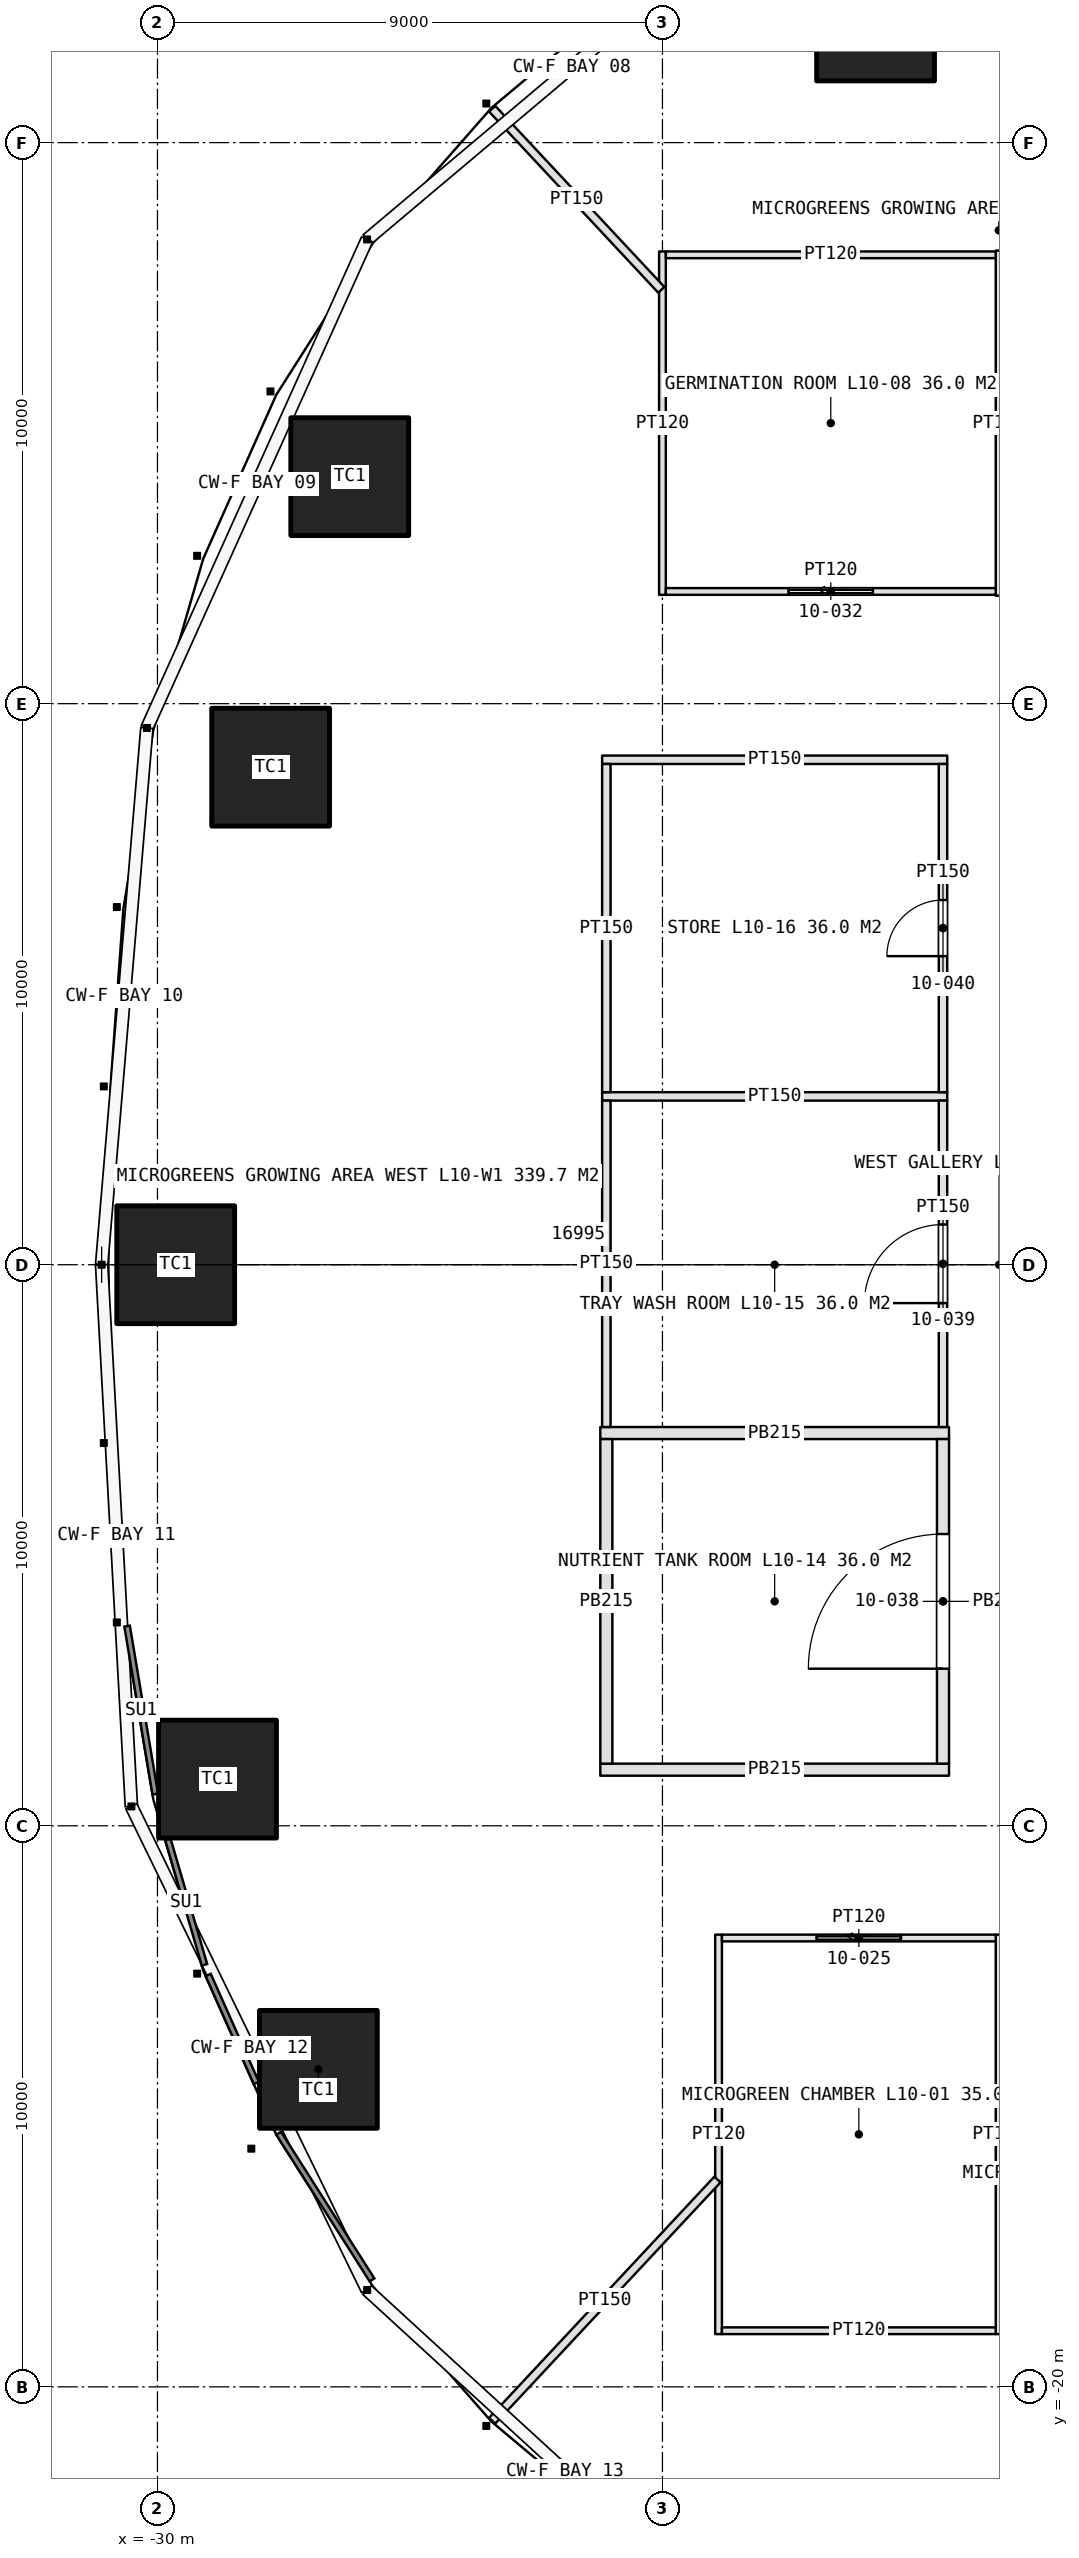
"""IFC4 building model, lengths in metres.
Left out: names, types, materials, properties, quantities, classifications, styles, units other than length and angle.
Written with IfcOpenShell. Run it as: python <this file> out.ifc"""

import sys

from ifc_helpers import new_model, si_unit, direction, frame, frame_2d, origin, origin_2d, place, context, subcontext, project, spatial, rectangle, extrude, element, fill, save


model = new_model("IFC4")
c1 = context("Model", 3, precision=1e-05, world=origin(), true_north=direction((0.0, 1.0)))
c2 = subcontext(c1, "Body", "Model", "MODEL_VIEW")
j1 = project(units=[si_unit("LENGTHUNIT", "METRE"), si_unit("PLANEANGLEUNIT", "RADIAN")], contexts=[c1])
p1 = place(None, origin())
s1 = spatial("IfcSite", under=j1, at=p1, CompositionType="ELEMENT")
p2 = place(p1, origin())
s2 = spatial("IfcBuilding", under=s1, at=p2, CompositionType="ELEMENT")
p3 = place(p2, frame((0.0, 0.0, 50.0)))
s3 = spatial("IfcBuildingStorey", under=s2, at=p3, CompositionType="ELEMENT", Elevation=50.0)
for number, where, z_axis, x_axis in (
    (1, (-17.202, 22.15, 0.0), (0.0, 0.0, 1.0), (1.0, 0.0, 0.0)),
    (2, (-26.573, 14.046, 0.0), (0.0, 0.0, 1.0), (1.0, 0.0, 0.0)),
    (3, (-27.983, 8.868, 0.0), (0.0, 0.0, 1.0), (1.0, 0.0, 0.0)),
    (4, (-29.675, 0.0, 0.0), (0.0, 0.0, 1.0), (1.0, 0.0, 0.0)),
    (5, (-28.93, -9.168, 0.0), (0.0, 0.0, 1.0), (1.0, 0.0, 0.0)),
    (6, (-27.132, -14.341, 0.0), (0.0, 0.0, 1.0), (1.0, 0.0, 0.0)),
):
    element("IfcColumn", number, at=place(p3, frame(where, z_axis=z_axis, x_axis=x_axis)), inside=s3, PredefinedType="COLUMN", context=c2, shape_type="SweptSolid", body=[
        extrude(rectangle(XDim=2.1, YDim=2.1, at=origin_2d()), origin(), (0.0, 0.0, 1.0), 5.0),
    ])
for number, where, z_axis, x_axis in (
    (7, (-20.0, -11.94, 0.0), (0.0, 0.0, 1.0), (0.0, -1.0, 0.0)),
    (8, (-15.0, -11.94, 0.0), (0.0, 0.0, 1.0), (0.0, -1.0, 0.0)),
):
    element("IfcWall", number, at=place(p3, frame(where, z_axis=z_axis, x_axis=x_axis)), inside=s3, PredefinedType="PARTITIONING", context=c2, shape_type="SweptSolid", body=[
        extrude(rectangle(XDim=7.12, YDim=0.12, at=frame_2d((3.56, 0.0))), origin(), (0.0, 0.0, 1.0), 3.6),
    ])
p4 = place(p3, frame((-19.94, -12.0, 0.0), z_axis=(0.0, 0.0, 1.0), x_axis=(1.0, 0.0, 0.0)))
e9 = element("IfcWall", 9, at=p4, inside=s3, PredefinedType="PARTITIONING", context=c2, shape_type="SweptSolid", body=[
    extrude(rectangle(XDim=4.88, YDim=0.12, at=frame_2d((2.44, 0.0))), origin(), (0.0, 0.0, 1.0), 3.6),
])
p5 = place(p4, frame((1.69, 0.0, 0.0)))
e10 = element("IfcOpeningElement", 10, at=p5, cuts=e9, PredefinedType="OPENING", context=c2, shape_type="SweptSolid", body=[
    extrude(rectangle(XDim=1.5, YDim=2.5, at=frame_2d((0.75, 1.25))), frame((0.0, 0.07, 0.0), z_axis=(0.0, -1.0, 0.0), x_axis=(1.0, 0.0, 0.0)), (0.0, 0.0, 1.0), 0.14),
])
p6 = place(p3, frame((-19.94, -19.0, 0.0), z_axis=(0.0, 0.0, 1.0), x_axis=(1.0, 0.0, 0.0)))
e11 = element("IfcWall", 11, at=p6, inside=s3, PredefinedType="PARTITIONING", context=c2, shape_type="SweptSolid", body=[
    extrude(rectangle(XDim=4.88, YDim=0.12, at=frame_2d((2.44, 0.0))), origin(), (0.0, 0.0, 1.0), 3.6),
])
p7 = place(p3, frame((-21.0, 11.94, 0.0), z_axis=(0.0, 0.0, 1.0), x_axis=(0.0, 1.0, 0.0)))
e12 = element("IfcWall", 12, at=p7, inside=s3, PredefinedType="PARTITIONING", context=c2, shape_type="SweptSolid", body=[
    extrude(rectangle(XDim=6.12, YDim=0.12, at=frame_2d((3.06, 0.0))), origin(), (0.0, 0.0, 1.0), 3.6),
])
p8 = place(p3, frame((-15.0, 11.925, 0.0), z_axis=(0.0, 0.0, 1.0), x_axis=(0.0, 1.0, 0.0)))
e13 = element("IfcWall", 13, at=p8, inside=s3, PredefinedType="PARTITIONING", context=c2, shape_type="SweptSolid", body=[
    extrude(rectangle(XDim=6.15, YDim=0.12, at=frame_2d((3.075, 0.0))), origin(), (0.0, 0.0, 1.0), 3.6),
])
p9 = place(p3, frame((-20.94, 12.0, 0.0), z_axis=(0.0, 0.0, 1.0), x_axis=(1.0, 0.0, 0.0)))
e14 = element("IfcWall", 14, at=p9, inside=s3, PredefinedType="PARTITIONING", context=c2, shape_type="SweptSolid", body=[
    extrude(rectangle(XDim=5.88, YDim=0.12, at=frame_2d((2.94, 0.0))), origin(), (0.0, 0.0, 1.0), 3.6),
])
p10 = place(p9, frame((2.19, 0.0, 0.0)))
e15 = element("IfcOpeningElement", 15, at=p10, cuts=e14, PredefinedType="OPENING", context=c2, shape_type="SweptSolid", body=[
    extrude(rectangle(XDim=1.5, YDim=2.5, at=frame_2d((0.75, 1.25))), frame((0.0, 0.07, 0.0), z_axis=(0.0, -1.0, 0.0), x_axis=(1.0, 0.0, 0.0)), (0.0, 0.0, 1.0), 0.14),
])
p11 = place(p3, frame((-20.94, 18.0, 0.0), z_axis=(0.0, 0.0, 1.0), x_axis=(1.0, 0.0, 0.0)))
e16 = element("IfcWall", 16, at=p11, inside=s3, PredefinedType="PARTITIONING", context=c2, shape_type="SweptSolid", body=[
    extrude(rectangle(XDim=5.88, YDim=0.12, at=frame_2d((2.94, 0.0))), origin(), (0.0, 0.0, 1.0), 3.6),
])
for number, where, z_axis, x_axis in (
    (17, (-15.893, -9.0, 0.0), (0.0, 0.0, 1.0), (-1.0, 0.0, 0.0)),
    (18, (-15.893, -3.0, 0.0), (0.0, 0.0, 1.0), (-1.0, 0.0, 0.0)),
):
    element("IfcWall", number, at=place(p3, frame(where, z_axis=z_axis, x_axis=x_axis)), inside=s3, PredefinedType="PARTITIONING", context=c2, shape_type="SweptSolid", body=[
        extrude(rectangle(XDim=6.215, YDim=0.215, at=frame_2d((3.107, 0.0))), origin(), (0.0, 0.0, 1.0), 3.6),
    ])
for number, where, z_axis, x_axis in (
    (19, (-15.925, 3.0, 0.0), (0.0, 0.0, 1.0), (-1.0, 0.0, 0.0)),
    (20, (-15.925, 9.0, 0.0), (0.0, 0.0, 1.0), (-1.0, 0.0, 0.0)),
):
    element("IfcWall", number, at=place(p3, frame(where, z_axis=z_axis, x_axis=x_axis)), inside=s3, PredefinedType="PARTITIONING", context=c2, shape_type="SweptSolid", body=[
        extrude(rectangle(XDim=6.15, YDim=0.15, at=frame_2d((3.075, 0.0))), origin(), (0.0, 0.0, 1.0), 3.6),
    ])
p12 = place(p3, frame((-16.0, -8.893, 0.0), z_axis=(0.0, 0.0, 1.0), x_axis=(0.0, 1.0, 0.0)))
e21 = element("IfcWall", 21, at=p12, inside=s3, PredefinedType="PARTITIONING", context=c2, shape_type="SweptSolid", body=[
    extrude(rectangle(XDim=5.785, YDim=0.215, at=frame_2d((2.893, 0.0))), origin(), (0.0, 0.0, 1.0), 3.6),
])
p13 = place(p12, frame((1.692, 0.0, 0.0)))
e22 = element("IfcOpeningElement", 22, at=p13, cuts=e21, PredefinedType="OPENING", context=c2, shape_type="SweptSolid", body=[
    extrude(rectangle(XDim=2.4, YDim=2.4, at=frame_2d((1.2, 1.2))), frame((0.0, 0.118, 0.0), z_axis=(0.0, -1.0, 0.0), x_axis=(1.0, 0.0, 0.0)), (0.0, 0.0, 1.0), 0.235),
])
p14 = place(p3, frame((-22.0, -8.893, 0.0), z_axis=(0.0, 0.0, 1.0), x_axis=(0.0, 1.0, 0.0)))
e23 = element("IfcWall", 23, at=p14, inside=s3, PredefinedType="PARTITIONING", context=c2, shape_type="SweptSolid", body=[
    extrude(rectangle(XDim=5.785, YDim=0.215, at=frame_2d((2.893, 0.0))), origin(), (0.0, 0.0, 1.0), 3.6),
])
p15 = place(p3, frame((-16.0, -2.893, 0.0), z_axis=(0.0, 0.0, 1.0), x_axis=(0.0, 1.0, 0.0)))
e24 = element("IfcWall", 24, at=p15, inside=s3, PredefinedType="PARTITIONING", context=c2, shape_type="SweptSolid", body=[
    extrude(rectangle(XDim=5.818, YDim=0.15, at=frame_2d((2.909, 0.0))), origin(), (0.0, 0.0, 1.0), 3.6),
])
p16 = place(p15, frame((2.209, 0.0, 0.0)))
e25 = element("IfcOpeningElement", 25, at=p16, cuts=e24, PredefinedType="OPENING", context=c2, shape_type="SweptSolid", body=[
    extrude(rectangle(XDim=1.4, YDim=2.4, at=frame_2d((0.7, 1.2))), frame((0.0, 0.085, 0.0), z_axis=(0.0, -1.0, 0.0), x_axis=(1.0, 0.0, 0.0)), (0.0, 0.0, 1.0), 0.17),
])
p17 = place(p3, frame((-22.0, -2.893, 0.0), z_axis=(0.0, 0.0, 1.0), x_axis=(0.0, 1.0, 0.0)))
e26 = element("IfcWall", 26, at=p17, inside=s3, PredefinedType="PARTITIONING", context=c2, shape_type="SweptSolid", body=[
    extrude(rectangle(XDim=5.818, YDim=0.15, at=frame_2d((2.909, 0.0))), origin(), (0.0, 0.0, 1.0), 3.6),
])
p18 = place(p3, frame((-16.0, 3.075, 0.0), z_axis=(0.0, 0.0, 1.0), x_axis=(0.0, 1.0, 0.0)))
e27 = element("IfcWall", 27, at=p18, inside=s3, PredefinedType="PARTITIONING", context=c2, shape_type="SweptSolid", body=[
    extrude(rectangle(XDim=5.85, YDim=0.15, at=frame_2d((2.925, 0.0))), origin(), (0.0, 0.0, 1.0), 3.6),
])
p19 = place(p18, frame((2.425, 0.0, 0.0)))
e28 = element("IfcOpeningElement", 28, at=p19, cuts=e27, PredefinedType="OPENING", context=c2, shape_type="SweptSolid", body=[
    extrude(rectangle(XDim=1.0, YDim=2.2, at=frame_2d((0.5, 1.1))), frame((0.0, 0.085, 0.0), z_axis=(0.0, -1.0, 0.0), x_axis=(1.0, 0.0, 0.0)), (0.0, 0.0, 1.0), 0.17),
])
p20 = place(p3, frame((-22.0, 3.075, 0.0), z_axis=(0.0, 0.0, 1.0), x_axis=(0.0, 1.0, 0.0)))
e29 = element("IfcWall", 29, at=p20, inside=s3, PredefinedType="PARTITIONING", context=c2, shape_type="SweptSolid", body=[
    extrude(rectangle(XDim=5.85, YDim=0.15, at=frame_2d((2.925, 0.0))), origin(), (0.0, 0.0, 1.0), 3.6),
])
p21 = place(p3, frame((-20.02, -16.305, 0.0), z_axis=(0.0, 0.0, 1.0), x_axis=(-0.682516386928, -0.730870290527, 0.0)))
e30 = element("IfcWall", 30, at=p21, inside=s3, PredefinedType="PARTITIONING", context=c2, shape_type="SweptSolid", body=[
    extrude(rectangle(XDim=5.882, YDim=0.15, at=frame_2d((2.941, 0.0))), origin(), (0.0, 0.0, 1.0), 3.6),
])
p22 = place(p3, frame((-21.02, 17.375, 0.0), z_axis=(0.0, 0.0, 1.0), x_axis=(-0.682511222631, 0.730875113123, 0.0)))
e31 = element("IfcWall", 31, at=p22, inside=s3, PredefinedType="PARTITIONING", context=c2, shape_type="SweptSolid", body=[
    extrude(rectangle(XDim=4.417, YDim=0.15, at=frame_2d((2.208, 0.0))), origin(), (0.0, 0.0, 1.0), 3.6),
])
p23 = place(p5, origin())
e32 = element("IfcDoor", 32, at=p23, inside=s3, OperationType="SLIDING_TO_LEFT", PredefinedType="DOOR", context=c2, shape_type="SweptSolid", body=[
    extrude(rectangle(XDim=1.5, YDim=2.5, at=frame_2d((0.75, 1.25))), frame((0.0, 0.025, 0.0), z_axis=(0.0, -1.0, 0.0), x_axis=(1.0, 0.0, 0.0)), (0.0, 0.0, 1.0), 0.05),
])
fill(e10, e32)
p24 = place(p10, origin())
e33 = element("IfcDoor", 33, at=p24, inside=s3, OperationType="SLIDING_TO_LEFT", PredefinedType="DOOR", context=c2, shape_type="SweptSolid", body=[
    extrude(rectangle(XDim=1.5, YDim=2.5, at=frame_2d((0.75, 1.25))), frame((0.0, 0.025, 0.0), z_axis=(0.0, -1.0, 0.0), x_axis=(1.0, 0.0, 0.0)), (0.0, 0.0, 1.0), 0.05),
])
fill(e15, e33)
p25 = place(p13, origin())
e34 = element("IfcDoor", 34, at=p25, inside=s3, OperationType="DOUBLE_DOOR_SINGLE_SWING", PredefinedType="DOOR", context=c2, shape_type="SweptSolid", body=[
    extrude(rectangle(XDim=2.4, YDim=2.4, at=frame_2d((1.2, 1.2))), frame((0.0, 0.025, 0.0), z_axis=(0.0, -1.0, 0.0), x_axis=(1.0, 0.0, 0.0)), (0.0, 0.0, 1.0), 0.05),
])
fill(e22, e34)
p26 = place(p16, origin())
e35 = element("IfcDoor", 35, at=p26, inside=s3, OperationType="DOUBLE_DOOR_DOUBLE_SWING", PredefinedType="DOOR", context=c2, shape_type="SweptSolid", body=[
    extrude(rectangle(XDim=1.4, YDim=2.4, at=frame_2d((0.7, 1.2))), frame((0.0, 0.025, 0.0), z_axis=(0.0, -1.0, 0.0), x_axis=(1.0, 0.0, 0.0)), (0.0, 0.0, 1.0), 0.05),
])
fill(e25, e35)
p27 = place(p19, origin())
e36 = element("IfcDoor", 36, at=p27, inside=s3, OperationType="SINGLE_SWING_LEFT", PredefinedType="DOOR", context=c2, shape_type="SweptSolid", body=[
    extrude(rectangle(XDim=1.0, YDim=2.2, at=frame_2d((0.5, 1.1))), frame((0.0, 0.025, 0.0), z_axis=(0.0, -1.0, 0.0), x_axis=(1.0, 0.0, 0.0)), (0.0, 0.0, 1.0), 0.05),
])
fill(e28, e36)
save(model, sys.argv[1])
